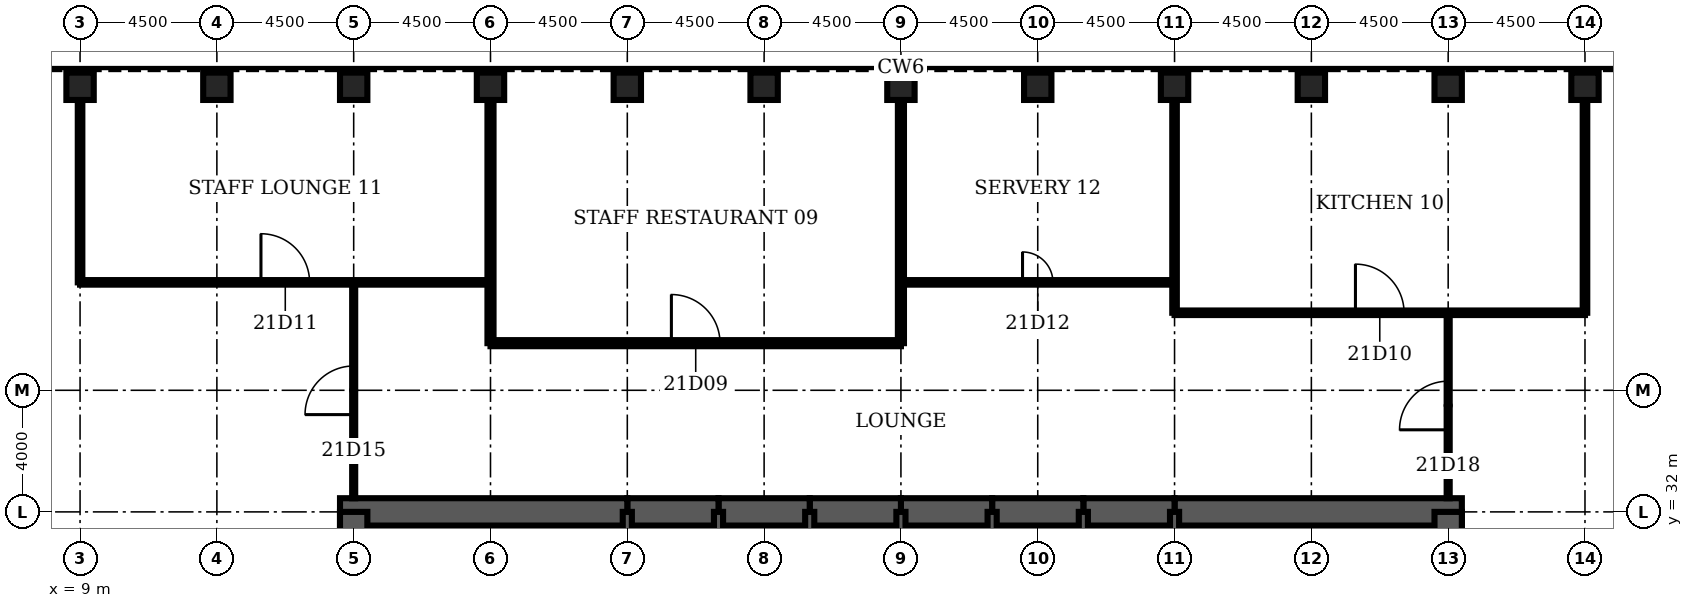
"""IFC4 building model, lengths in metres.
Left out: names, types, materials, properties, quantities, classifications, styles, units other than length and angle.
Written with IfcOpenShell. Run it as: python <this file> out.ifc"""

import sys

from ifc_helpers import new_model, si_unit, direction, frame, frame_2d, origin, origin_2d, place, context, subcontext, project, spatial, rectangle, hollow_rectangle, extrude, element, fill, save


model = new_model("IFC4")
c1 = context("Model", 3, precision=1e-05, world=origin(), true_north=direction((0.0, 1.0)))
c2 = subcontext(c1, "Body", "Model", "MODEL_VIEW")
j1 = project(units=[si_unit("LENGTHUNIT", "METRE"), si_unit("PLANEANGLEUNIT", "RADIAN")], contexts=[c1])
p1 = place(None, origin())
s1 = spatial("IfcSite", under=j1, at=p1, CompositionType="ELEMENT")
p2 = place(p1, origin())
s2 = spatial("IfcBuilding", under=s1, at=p2, CompositionType="ELEMENT")
p3 = place(p2, frame((0.0, 0.0, 100.5)))
s3 = spatial("IfcBuildingStorey", under=s2, at=p3, CompositionType="ELEMENT", Elevation=100.5)
for number, where, z_axis, x_axis in (
    (1, (58.5, 46.0, 0.0), (0.0, 0.0, 1.0), (0.0, 1.0, 0.0)),
    (2, (54.0, 46.0, 0.0), (0.0, 0.0, 1.0), (0.0, 1.0, 0.0)),
    (3, (49.5, 46.0, 0.0), (0.0, 0.0, 1.0), (0.0, 1.0, 0.0)),
    (4, (45.0, 46.0, 0.0), (0.0, 0.0, 1.0), (0.0, 1.0, 0.0)),
    (5, (40.5, 46.0, 0.0), (0.0, 0.0, 1.0), (0.0, 1.0, 0.0)),
    (6, (36.0, 46.0, 0.0), (0.0, 0.0, 1.0), (0.0, 1.0, 0.0)),
    (7, (31.5, 46.0, 0.0), (0.0, 0.0, 1.0), (0.0, 1.0, 0.0)),
    (8, (27.0, 46.0, 0.0), (0.0, 0.0, 1.0), (0.0, 1.0, 0.0)),
    (9, (22.5, 46.0, 0.0), (0.0, 0.0, 1.0), (0.0, 1.0, 0.0)),
    (10, (18.0, 46.0, 0.0), (0.0, 0.0, 1.0), (0.0, 1.0, 0.0)),
    (11, (13.5, 46.0, 0.0), (0.0, 0.0, 1.0), (0.0, 1.0, 0.0)),
    (12, (9.0, 46.0, 0.0), (0.0, 0.0, 1.0), (0.0, 1.0, 0.0)),
):
    element("IfcColumn", number, at=place(p3, frame(where, z_axis=z_axis, x_axis=x_axis)), inside=s3, PredefinedType="COLUMN", context=c2, shape_type="SweptSolid", body=[
        extrude(hollow_rectangle(XDim=0.9, YDim=0.9, WallThickness=0.11, at=origin_2d()), origin(), (0.0, 0.0, 1.0), 4.2),
    ])
p4 = place(p3, frame((54.45, 32.0, 0.0), z_axis=(0.0, 0.0, 1.0), x_axis=(-1.0, 0.0, 0.0)))
e13 = element("IfcWall", 13, at=p4, inside=s3, PredefinedType="SHEAR", context=c2, shape_type="SweptSolid", body=[
    extrude(rectangle(XDim=9.45, YDim=0.9, at=frame_2d((4.725, 0.0))), origin(), (0.0, 0.0, 1.0), 4.2),
])
for number, where, z_axis, x_axis in (
    (14, (45.0, 32.0, 0.0), (0.0, 0.0, 1.0), (-1.0, 0.0, 0.0)),
    (15, (42.0, 32.0, 0.0), (0.0, 0.0, 1.0), (-1.0, 0.0, 0.0)),
    (16, (39.0, 32.0, 0.0), (0.0, 0.0, 1.0), (-1.0, 0.0, 0.0)),
    (17, (36.0, 32.0, 0.0), (0.0, 0.0, 1.0), (-1.0, 0.0, 0.0)),
    (18, (33.0, 32.0, 0.0), (0.0, 0.0, 1.0), (-1.0, 0.0, 0.0)),
    (19, (30.0, 32.0, 0.0), (0.0, 0.0, 1.0), (-1.0, 0.0, 0.0)),
):
    element("IfcWall", number, at=place(p3, frame(where, z_axis=z_axis, x_axis=x_axis)), inside=s3, PredefinedType="SHEAR", context=c2, shape_type="SweptSolid", body=[
        extrude(rectangle(XDim=3.0, YDim=0.9, at=frame_2d((1.5, 0.0))), origin(), (0.0, 0.0, 1.0), 4.2),
    ])
p5 = place(p3, frame((27.0, 32.0, 0.0), z_axis=(0.0, 0.0, 1.0), x_axis=(-1.0, 0.0, 0.0)))
e20 = element("IfcWall", 20, at=p5, inside=s3, PredefinedType="SHEAR", context=c2, shape_type="SweptSolid", body=[
    extrude(rectangle(XDim=9.45, YDim=0.9, at=frame_2d((4.725, 0.0))), origin(), (0.0, 0.0, 1.0), 4.2),
])
for number, where, z_axis, x_axis in (
    (21, (18.0, 32.0, 0.0), (0.0, 0.0, 1.0), (0.0, -1.0, 0.0)),
    (22, (54.0, 28.8, 0.0), (0.0, 0.0, 1.0), (0.0, 1.0, 0.0)),
):
    element("IfcWall", number, at=place(p3, frame(where, z_axis=z_axis, x_axis=x_axis)), inside=s3, PredefinedType="SHEAR", context=c2, shape_type="SweptSolid", body=[
        extrude(rectangle(XDim=3.2, YDim=0.9, at=frame_2d((1.6, 0.0))), origin(), (0.0, 0.0, 1.0), 4.2),
    ])
for number, where, z_axis, x_axis in (
    (23, (27.0, 28.8, 0.0), (0.0, 0.0, 1.0), (0.0, 1.0, 0.0)),
    (24, (30.0, 28.8, 0.0), (0.0, 0.0, 1.0), (0.0, 1.0, 0.0)),
    (25, (33.0, 28.8, 0.0), (0.0, 0.0, 1.0), (0.0, 1.0, 0.0)),
    (26, (36.0, 28.8, 0.0), (0.0, 0.0, 1.0), (0.0, 1.0, 0.0)),
    (27, (39.0, 28.8, 0.0), (0.0, 0.0, 1.0), (0.0, 1.0, 0.0)),
    (28, (42.0, 28.8, 0.0), (0.0, 0.0, 1.0), (0.0, 1.0, 0.0)),
    (29, (45.0, 28.8, 0.0), (0.0, 0.0, 1.0), (0.0, 1.0, 0.0)),
):
    element("IfcWall", number, at=place(p3, frame(where, z_axis=z_axis, x_axis=x_axis)), inside=s3, PredefinedType="SOLIDWALL", context=c2, shape_type="SweptSolid", body=[
        extrude(rectangle(XDim=3.2, YDim=0.3, at=frame_2d((1.6, 0.0))), origin(), (0.0, 0.0, 1.0), 4.2),
    ])
p6 = place(p3, frame((22.5, 37.55, 0.0), z_axis=(0.0, 0.0, 1.0), x_axis=(1.0, 0.0, 0.0)))
e30 = element("IfcWall", 30, at=p6, inside=s3, PredefinedType="PARTITIONING", context=c2, shape_type="SweptSolid", body=[
    extrude(rectangle(XDim=13.5, YDim=0.2, at=frame_2d((6.75, 0.0))), origin(), (0.0, 0.0, 1.0), 3.0),
])
p7 = place(p6, frame((5.95, 0.0, 0.0)))
e31 = element("IfcOpeningElement", 31, at=p7, cuts=e30, PredefinedType="OPENING", context=c2, shape_type="SweptSolid", body=[
    extrude(rectangle(XDim=1.6, YDim=2.1, at=frame_2d((0.8, 1.05))), frame((0.0, 0.11, 0.0), z_axis=(0.0, -1.0, 0.0), x_axis=(1.0, 0.0, 0.0)), (0.0, 0.0, 1.0), 0.22),
])
p8 = place(p3, frame((45.0, 38.55, 0.0), z_axis=(0.0, 0.0, 1.0), x_axis=(1.0, 0.0, 0.0)))
e32 = element("IfcWall", 32, at=p8, inside=s3, PredefinedType="PARTITIONING", context=c2, shape_type="SweptSolid", body=[
    extrude(rectangle(XDim=13.5, YDim=0.15, at=frame_2d((6.75, 0.0))), origin(), (0.0, 0.0, 1.0), 3.0),
])
p9 = place(p8, frame((5.95, 0.0, 0.0)))
e33 = element("IfcOpeningElement", 33, at=p9, cuts=e32, PredefinedType="OPENING", context=c2, shape_type="SweptSolid", body=[
    extrude(rectangle(XDim=1.6, YDim=2.1, at=frame_2d((0.8, 1.05))), frame((0.0, 0.085, 0.0), z_axis=(0.0, -1.0, 0.0), x_axis=(1.0, 0.0, 0.0)), (0.0, 0.0, 1.0), 0.17),
])
p10 = place(p3, frame((9.0, 39.55, 0.0), z_axis=(0.0, 0.0, 1.0), x_axis=(1.0, 0.0, 0.0)))
e34 = element("IfcWall", 34, at=p10, inside=s3, PredefinedType="PARTITIONING", context=c2, shape_type="SweptSolid", body=[
    extrude(rectangle(XDim=13.5, YDim=0.15, at=frame_2d((6.75, 0.0))), origin(), (0.0, 0.0, 1.0), 3.0),
])
p11 = place(p10, frame((5.95, 0.0, 0.0)))
e35 = element("IfcOpeningElement", 35, at=p11, cuts=e34, PredefinedType="OPENING", context=c2, shape_type="SweptSolid", body=[
    extrude(rectangle(XDim=1.6, YDim=2.1, at=frame_2d((0.8, 1.05))), frame((0.0, 0.085, 0.0), z_axis=(0.0, -1.0, 0.0), x_axis=(1.0, 0.0, 0.0)), (0.0, 0.0, 1.0), 0.17),
])
p12 = place(p3, frame((36.0, 39.55, 0.0), z_axis=(0.0, 0.0, 1.0), x_axis=(1.0, 0.0, 0.0)))
e36 = element("IfcWall", 36, at=p12, inside=s3, PredefinedType="PARTITIONING", context=c2, shape_type="SweptSolid", body=[
    extrude(rectangle(XDim=9.0, YDim=0.15, at=frame_2d((4.5, 0.0))), origin(), (0.0, 0.0, 1.0), 3.0),
])
p13 = place(p12, frame((4.0, 0.0, 0.0)))
e37 = element("IfcOpeningElement", 37, at=p13, cuts=e36, PredefinedType="OPENING", context=c2, shape_type="SweptSolid", body=[
    extrude(rectangle(XDim=1.0, YDim=2.1, at=frame_2d((0.5, 1.05))), frame((0.0, 0.085, 0.0), z_axis=(0.0, -1.0, 0.0), x_axis=(1.0, 0.0, 0.0)), (0.0, 0.0, 1.0), 0.17),
])
p14 = place(p3, frame((9.0, 39.55, 0.0), z_axis=(0.0, 0.0, 1.0), x_axis=(0.0, 1.0, 0.0)))
e38 = element("IfcWall", 38, at=p14, inside=s3, PredefinedType="PARTITIONING", context=c2, shape_type="SweptSolid", body=[
    extrude(rectangle(XDim=6.0, YDim=0.15, at=frame_2d((3.0, 0.0))), origin(), (0.0, 0.0, 1.0), 3.0),
])
p15 = place(p3, frame((18.0, 32.45, 0.0), z_axis=(0.0, 0.0, 1.0), x_axis=(0.0, 1.0, 0.0)))
e39 = element("IfcWall", 39, at=p15, inside=s3, PredefinedType="PARTITIONING", context=c2, shape_type="SweptSolid", body=[
    extrude(rectangle(XDim=7.1, YDim=0.1, at=frame_2d((3.55, 0.0))), origin(), (0.0, 0.0, 1.0), 3.0),
])
p16 = place(p15, frame((2.75, 0.0, 0.0)))
e40 = element("IfcOpeningElement", 40, at=p16, cuts=e39, PredefinedType="OPENING", context=c2, shape_type="SweptSolid", body=[
    extrude(rectangle(XDim=1.6, YDim=2.1, at=frame_2d((0.8, 1.05))), frame((0.0, 0.06, 0.0), z_axis=(0.0, -1.0, 0.0), x_axis=(1.0, 0.0, 0.0)), (0.0, 0.0, 1.0), 0.12),
])
for number, where, z_axis, x_axis in (
    (41, (22.5, 37.55, 0.0), (0.0, 0.0, 1.0), (0.0, 1.0, 0.0)),
    (42, (36.0, 37.55, 0.0), (0.0, 0.0, 1.0), (0.0, 1.0, 0.0)),
):
    element("IfcWall", number, at=place(p3, frame(where, z_axis=z_axis, x_axis=x_axis)), inside=s3, PredefinedType="PARTITIONING", context=c2, shape_type="SweptSolid", body=[
        extrude(rectangle(XDim=8.0, YDim=0.2, at=frame_2d((4.0, 0.0))), origin(), (0.0, 0.0, 1.0), 3.0),
    ])
p17 = place(p3, frame((45.0, 38.55, 0.0), z_axis=(0.0, 0.0, 1.0), x_axis=(0.0, 1.0, 0.0)))
e43 = element("IfcWall", 43, at=p17, inside=s3, PredefinedType="PARTITIONING", context=c2, shape_type="SweptSolid", body=[
    extrude(rectangle(XDim=7.0, YDim=0.15, at=frame_2d((3.5, 0.0))), origin(), (0.0, 0.0, 1.0), 3.0),
])
p18 = place(p3, frame((54.0, 32.45, 0.0), z_axis=(0.0, 0.0, 1.0), x_axis=(0.0, 1.0, 0.0)))
e44 = element("IfcWall", 44, at=p18, inside=s3, PredefinedType="PARTITIONING", context=c2, shape_type="SweptSolid", body=[
    extrude(rectangle(XDim=6.1, YDim=0.1, at=frame_2d((3.05, 0.0))), origin(), (0.0, 0.0, 1.0), 3.0),
])
p19 = place(p18, frame((2.25, 0.0, 0.0)))
e45 = element("IfcOpeningElement", 45, at=p19, cuts=e44, PredefinedType="OPENING", context=c2, shape_type="SweptSolid", body=[
    extrude(rectangle(XDim=1.6, YDim=2.1, at=frame_2d((0.8, 1.05))), frame((0.0, 0.06, 0.0), z_axis=(0.0, -1.0, 0.0), x_axis=(1.0, 0.0, 0.0)), (0.0, 0.0, 1.0), 0.12),
])
p20 = place(p3, frame((58.5, 38.55, 0.0), z_axis=(0.0, 0.0, 1.0), x_axis=(0.0, 1.0, 0.0)))
e46 = element("IfcWall", 46, at=p20, inside=s3, PredefinedType="PARTITIONING", context=c2, shape_type="SweptSolid", body=[
    extrude(rectangle(XDim=7.0, YDim=0.15, at=frame_2d((3.5, 0.0))), origin(), (0.0, 0.0, 1.0), 3.0),
])
p21 = place(p7, origin())
e47 = element("IfcDoor", 47, at=p21, inside=s3, OperationType="SINGLE_SWING_LEFT", PredefinedType="DOOR", context=c2, shape_type="SweptSolid", body=[
    extrude(rectangle(XDim=1.6, YDim=2.1, at=frame_2d((0.8, 1.05))), frame((0.0, 0.025, 0.0), z_axis=(0.0, -1.0, 0.0), x_axis=(1.0, 0.0, 0.0)), (0.0, 0.0, 1.0), 0.05),
])
fill(e31, e47)
p22 = place(p9, origin())
e48 = element("IfcDoor", 48, at=p22, inside=s3, OperationType="SINGLE_SWING_LEFT", PredefinedType="DOOR", context=c2, shape_type="SweptSolid", body=[
    extrude(rectangle(XDim=1.6, YDim=2.1, at=frame_2d((0.8, 1.05))), frame((0.0, 0.025, 0.0), z_axis=(0.0, -1.0, 0.0), x_axis=(1.0, 0.0, 0.0)), (0.0, 0.0, 1.0), 0.05),
])
fill(e33, e48)
p23 = place(p11, origin())
e49 = element("IfcDoor", 49, at=p23, inside=s3, OperationType="SINGLE_SWING_LEFT", PredefinedType="DOOR", context=c2, shape_type="SweptSolid", body=[
    extrude(rectangle(XDim=1.6, YDim=2.1, at=frame_2d((0.8, 1.05))), frame((0.0, 0.025, 0.0), z_axis=(0.0, -1.0, 0.0), x_axis=(1.0, 0.0, 0.0)), (0.0, 0.0, 1.0), 0.05),
])
fill(e35, e49)
p24 = place(p13, origin())
e50 = element("IfcDoor", 50, at=p24, inside=s3, OperationType="SINGLE_SWING_LEFT", PredefinedType="DOOR", context=c2, shape_type="SweptSolid", body=[
    extrude(rectangle(XDim=1.0, YDim=2.1, at=frame_2d((0.5, 1.05))), frame((0.0, 0.025, 0.0), z_axis=(0.0, -1.0, 0.0), x_axis=(1.0, 0.0, 0.0)), (0.0, 0.0, 1.0), 0.05),
])
fill(e37, e50)
p25 = place(p16, origin())
e51 = element("IfcDoor", 51, at=p25, inside=s3, OperationType="SINGLE_SWING_LEFT", PredefinedType="DOOR", context=c2, shape_type="SweptSolid", body=[
    extrude(rectangle(XDim=1.6, YDim=2.1, at=frame_2d((0.8, 1.05))), frame((0.0, 0.025, 0.0), z_axis=(0.0, -1.0, 0.0), x_axis=(1.0, 0.0, 0.0)), (0.0, 0.0, 1.0), 0.05),
])
fill(e40, e51)
p26 = place(p19, origin())
e52 = element("IfcDoor", 52, at=p26, inside=s3, OperationType="SINGLE_SWING_LEFT", PredefinedType="DOOR", context=c2, shape_type="SweptSolid", body=[
    extrude(rectangle(XDim=1.6, YDim=2.1, at=frame_2d((0.8, 1.05))), frame((0.0, 0.025, 0.0), z_axis=(0.0, -1.0, 0.0), x_axis=(1.0, 0.0, 0.0)), (0.0, 0.0, 1.0), 0.05),
])
fill(e45, e52)
save(model, sys.argv[1])
